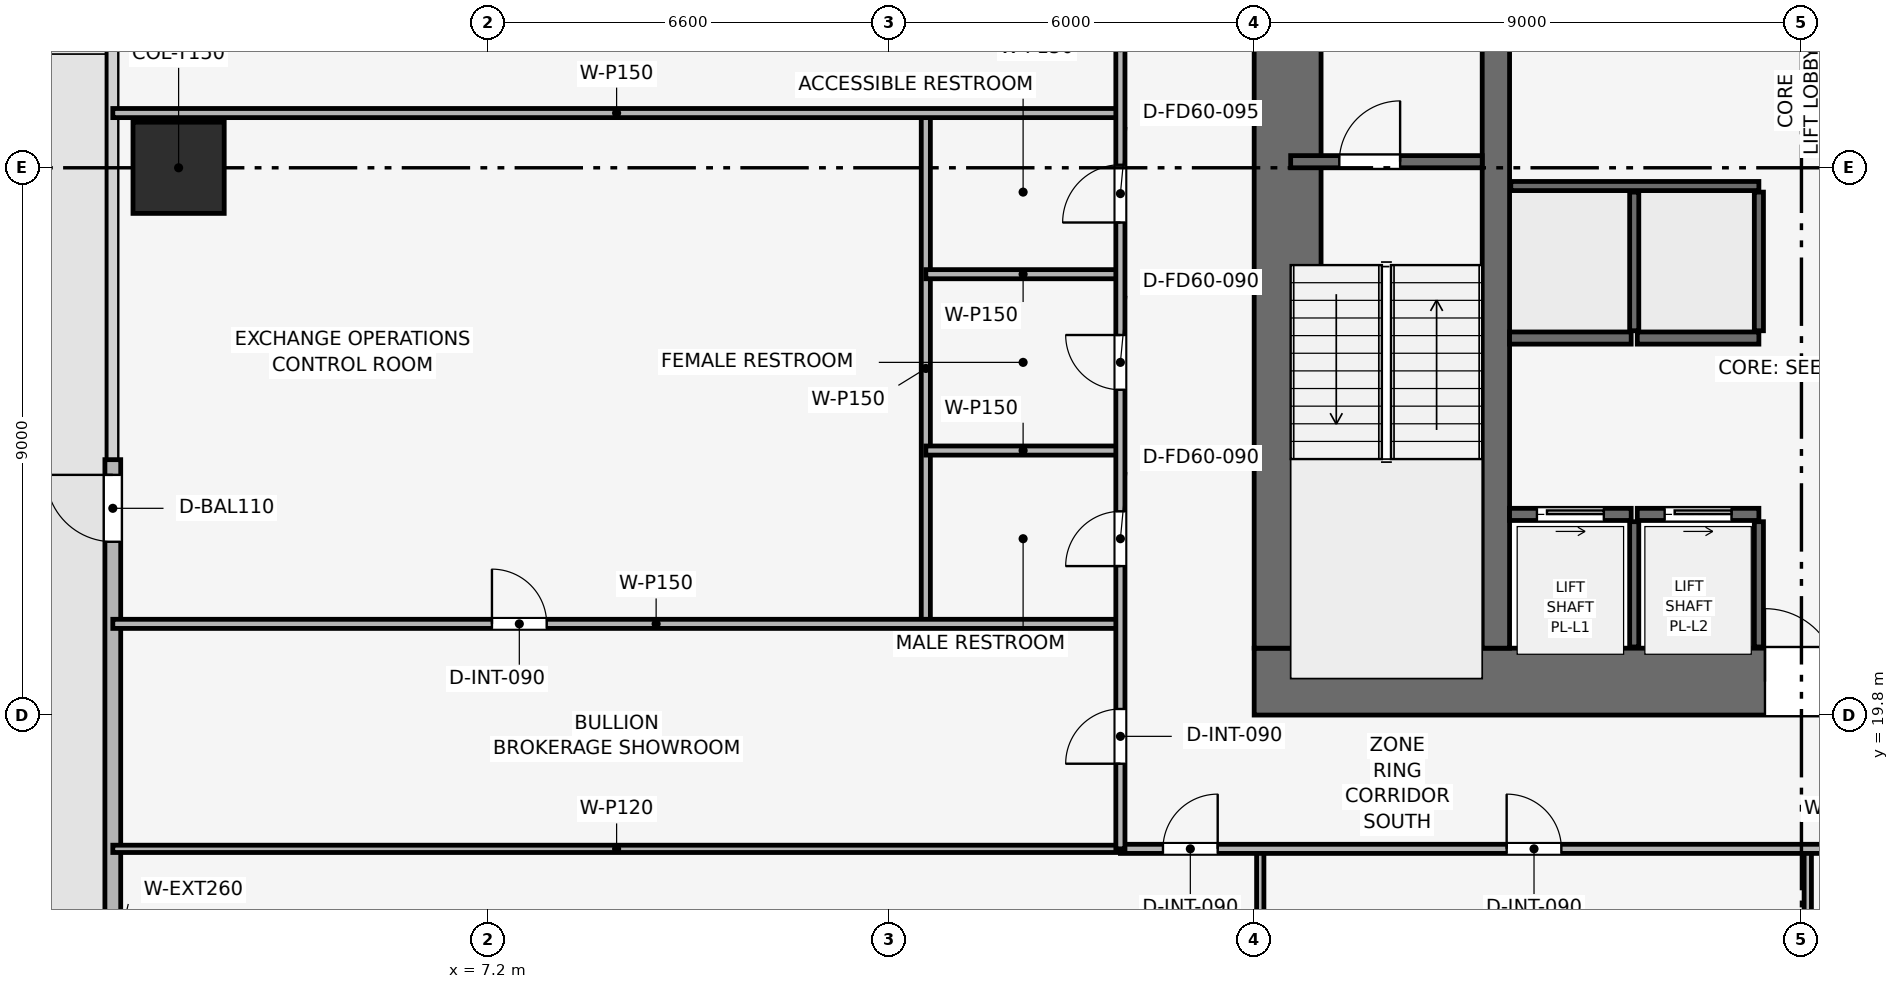
"""IFC4 building model, lengths in metres.
Left out: names, types, materials, properties, quantities, classifications, styles, units other than length and angle.
Written with IfcOpenShell. Run it as: python <this file> out.ifc"""

import sys

from ifc_helpers import new_model, si_unit, direction, frame, frame_2d, origin, origin_2d, place, context, subcontext, project, spatial, rectangle, extrude, element, fill, save


model = new_model("IFC4")
c1 = context("Model", 3, precision=1e-05, world=origin(), true_north=direction((0.0, 1.0)))
c2 = subcontext(c1, "Body", "Model", "MODEL_VIEW")
j1 = project(units=[si_unit("LENGTHUNIT", "METRE"), si_unit("PLANEANGLEUNIT", "RADIAN")], contexts=[c1])
p1 = place(None, origin())
s1 = spatial("IfcSite", under=j1, at=p1, CompositionType="ELEMENT")
p2 = place(p1, origin())
s2 = spatial("IfcBuilding", under=s1, at=p2, CompositionType="ELEMENT")
p3 = place(p2, frame((0.0, 0.0, 104.1)))
s3 = spatial("IfcBuildingStorey", under=s2, at=p3, CompositionType="ELEMENT", Elevation=104.1)
p4 = place(p3, frame((19.8, 20.35, 0.0), z_axis=(0.0, 0.0, 1.0), x_axis=(1.0, 0.0, 0.0)))
e1 = element("IfcWall", 1, at=p4, inside=s3, PredefinedType="SHEAR", context=c2, shape_type="SweptSolid", body=[
    extrude(rectangle(XDim=18.0, YDim=1.1, at=frame_2d((9.0, 0.0))), origin(), (0.0, 0.0, 1.0), 3.9),
])
p5 = place(p4, frame((8.4, 0.0, 0.0)))
e2 = element("IfcOpeningElement", 2, at=p5, cuts=e1, PredefinedType="OPENING", context=c2, shape_type="SweptSolid", body=[
    extrude(rectangle(XDim=1.2, YDim=2.2, at=frame_2d((0.6, 1.1))), frame((0.0, 0.56, 0.0), z_axis=(0.0, -1.0, 0.0), x_axis=(1.0, 0.0, 0.0)), (0.0, 0.0, 1.0), 1.12),
])
p6 = place(p3, frame((20.35, 20.9, 0.0), z_axis=(0.0, 0.0, 1.0), x_axis=(0.0, 1.0, 0.0)))
e3 = element("IfcWall", 3, at=p6, inside=s3, PredefinedType="SHEAR", context=c2, shape_type="SweptSolid", body=[
    extrude(rectangle(XDim=15.8, YDim=1.1, at=frame_2d((7.9, 0.0))), origin(), (0.0, 0.0, 1.0), 3.9),
])
p7 = place(p6, frame((9.9, 0.0, 0.0)))
e4 = element("IfcOpeningElement", 4, at=p7, cuts=e3, PredefinedType="OPENING", context=c2, shape_type="SweptSolid", body=[
    extrude(rectangle(XDim=1.1, YDim=2.15, at=frame_2d((0.55, 1.075))), frame((0.0, 0.56, 0.0), z_axis=(0.0, -1.0, 0.0), x_axis=(1.0, 0.0, 0.0)), (0.0, 0.0, 1.0), 1.12),
])
p8 = place(p3, frame((23.775, 20.9, 0.0), z_axis=(0.0, 0.0, 1.0), x_axis=(0.0, 1.0, 0.0)))
e5 = element("IfcWall", 5, at=p8, inside=s3, PredefinedType="SHEAR", context=c2, shape_type="SweptSolid", body=[
    extrude(rectangle(XDim=15.8, YDim=0.45, at=frame_2d((7.9, 0.0))), origin(), (0.0, 0.0, 1.0), 3.9),
])
p9 = place(p3, frame((2.112, 28.8, 0.053), z_axis=(0.224854519766, 0.0, 0.974392346512), x_axis=(0.0, 1.0, 0.0)))
e6 = element("IfcColumn", 6, at=p9, inside=s3, PredefinedType="COLUMN", context=c2, shape_type="SweptSolid", body=[
    extrude(rectangle(XDim=1.5, YDim=1.5, at=origin_2d()), origin(), (0.0, 0.0, 1.0), 3.575),
])
p10 = place(p3, frame((1.03, 8.7, 0.0), z_axis=(0.0, 0.0, 1.0), x_axis=(0.0, 1.0, 0.0)))
e7 = element("IfcWall", 7, at=p10, inside=s3, PredefinedType="SOLIDWALL", context=c2, shape_type="SweptSolid", body=[
    extrude(rectangle(XDim=15.3, YDim=0.26, at=frame_2d((7.65, 0.0))), origin(), (0.0, 0.0, 1.0), 3.54),
])
p11 = place(p10, frame((13.95, 0.0, 0.0)))
e8 = element("IfcOpeningElement", 8, at=p11, cuts=e7, PredefinedType="OPENING", context=c2, shape_type="SweptSolid", body=[
    extrude(rectangle(XDim=1.1, YDim=2.2, at=frame_2d((0.55, 1.1))), frame((0.0, 0.14, 0.0), z_axis=(0.0, -1.0, 0.0), x_axis=(1.0, 0.0, 0.0)), (0.0, 0.0, 1.0), 0.28),
])
p12 = place(p3, frame((20.4, 28.9, 0.0), z_axis=(0.0, 0.0, 1.0), x_axis=(1.0, 0.0, 0.0)))
e9 = element("IfcWall", 9, at=p12, inside=s3, PredefinedType="SHEAR", context=c2, shape_type="SweptSolid", body=[
    extrude(rectangle(XDim=3.15, YDim=0.2, at=frame_2d((1.575, 0.0))), origin(), (0.0, 0.0, 1.0), 3.54),
])
p13 = place(p12, frame((0.8, 0.0, 0.0)))
e10 = element("IfcOpeningElement", 10, at=p13, cuts=e9, PredefinedType="OPENING", context=c2, shape_type="SweptSolid", body=[
    extrude(rectangle(XDim=1.0, YDim=2.1, at=frame_2d((0.5, 1.05))), frame((0.0, 0.11, 0.0), z_axis=(0.0, -1.0, 0.0), x_axis=(1.0, 0.0, 0.0)), (0.0, 0.0, 1.0), 0.22),
])
p14 = place(p3, frame((24.0, 23.1, 0.0), z_axis=(0.0, 0.0, 1.0), x_axis=(1.0, 0.0, 0.0)))
e11 = element("IfcWall", 11, at=p14, inside=s3, PredefinedType="SHEAR", context=c2, shape_type="SweptSolid", body=[
    extrude(rectangle(XDim=2.0, YDim=0.2, at=frame_2d((1.0, 0.0))), origin(), (0.0, 0.0, 1.0), 3.54),
])
p15 = place(p14, frame((0.45, 0.0, 0.0)))
e12 = element("IfcOpeningElement", 12, at=p15, cuts=e11, PredefinedType="OPENING", context=c2, shape_type="SweptSolid", body=[
    extrude(rectangle(XDim=1.1, YDim=2.15, at=frame_2d((0.55, 1.075))), frame((0.0, 0.11, 0.0), z_axis=(0.0, -1.0, 0.0), x_axis=(1.0, 0.0, 0.0)), (0.0, 0.0, 1.0), 0.22),
])
p16 = place(p3, frame((26.1, 23.1, 0.0), z_axis=(0.0, 0.0, 1.0), x_axis=(1.0, 0.0, 0.0)))
e13 = element("IfcWall", 13, at=p16, inside=s3, PredefinedType="SHEAR", context=c2, shape_type="SweptSolid", body=[
    extrude(rectangle(XDim=2.0, YDim=0.2, at=frame_2d((1.0, 0.0))), origin(), (0.0, 0.0, 1.0), 3.54),
])
p17 = place(p16, frame((0.45, 0.0, 0.0)))
e14 = element("IfcOpeningElement", 14, at=p17, cuts=e13, PredefinedType="OPENING", context=c2, shape_type="SweptSolid", body=[
    extrude(rectangle(XDim=1.1, YDim=2.15, at=frame_2d((0.55, 1.075))), frame((0.0, 0.11, 0.0), z_axis=(0.0, -1.0, 0.0), x_axis=(1.0, 0.0, 0.0)), (0.0, 0.0, 1.0), 0.22),
])
for number, where, z_axis, x_axis in (
    (15, (24.0, 26.0, 0.0), (0.0, 0.0, 1.0), (1.0, 0.0, 0.0)),
    (16, (26.1, 26.0, 0.0), (0.0, 0.0, 1.0), (1.0, 0.0, 0.0)),
):
    element("IfcWall", number, at=place(p3, frame(where, z_axis=z_axis, x_axis=x_axis)), inside=s3, PredefinedType="SHEAR", context=c2, shape_type="SweptSolid", body=[
        extrude(rectangle(XDim=2.0, YDim=0.2, at=frame_2d((1.0, 0.0))), origin(), (0.0, 0.0, 1.0), 3.54),
    ])
for number, where, z_axis, x_axis in (
    (17, (26.05, 20.92, 0.0), (0.0, 0.0, 1.0), (0.0, 1.0, 0.0)),
    (18, (28.1, 20.92, 0.0), (0.0, 0.0, 1.0), (0.0, 1.0, 0.0)),
):
    element("IfcWall", number, at=place(p3, frame(where, z_axis=z_axis, x_axis=x_axis)), inside=s3, PredefinedType="SHEAR", context=c2, shape_type="SweptSolid", body=[
        extrude(rectangle(XDim=2.06, YDim=0.15, at=frame_2d((1.03, 0.0))), origin(), (0.0, 0.0, 1.0), 3.54),
    ])
p18 = place(p3, frame((24.02, 28.5, 0.0), z_axis=(0.0, 0.0, 1.0), x_axis=(1.0, 0.0, 0.0)))
e19 = element("IfcWall", 19, at=p18, inside=s3, PredefinedType="SHEAR", context=c2, shape_type="SweptSolid", body=[
    extrude(rectangle(XDim=4.08, YDim=0.15, at=frame_2d((2.04, 0.0))), origin(), (0.0, 0.0, 1.0), 3.54),
])
for number, where, z_axis, x_axis in (
    (20, (26.05, 26.12, 0.0), (0.0, 0.0, 1.0), (0.0, 1.0, 0.0)),
    (21, (28.1, 26.12, 0.0), (0.0, 0.0, 1.0), (0.0, 1.0, 0.0)),
):
    element("IfcWall", number, at=place(p3, frame(where, z_axis=z_axis, x_axis=x_axis)), inside=s3, PredefinedType="SHEAR", context=c2, shape_type="SweptSolid", body=[
        extrude(rectangle(XDim=2.28, YDim=0.15, at=frame_2d((1.14, 0.0))), origin(), (0.0, 0.0, 1.0), 3.54),
    ])
p19 = place(p3, frame((19.9, 1.03, 0.0), z_axis=(0.0, 0.0, 1.0), x_axis=(0.0, 1.0, 0.0)))
e22 = element("IfcWall", 22, at=p19, inside=s3, PredefinedType="PARTITIONING", context=c2, shape_type="SweptSolid", body=[
    extrude(rectangle(XDim=16.57, YDim=0.12, at=frame_2d((8.285, 0.0))), origin(), (0.0, 0.0, 1.0), 2.825),
])
p20 = place(p3, frame((28.904, 1.03, 0.0), z_axis=(0.0, 0.0, 1.0), x_axis=(0.0, 1.0, 0.0)))
e23 = element("IfcWall", 23, at=p20, inside=s3, PredefinedType="PARTITIONING", context=c2, shape_type="SweptSolid", body=[
    extrude(rectangle(XDim=16.57, YDim=0.12, at=frame_2d((8.285, 0.0))), origin(), (0.0, 0.0, 1.0), 2.975),
])
p21 = place(p3, frame((1.03, 17.6, 0.0), z_axis=(0.0, 0.0, 1.0), x_axis=(1.0, 0.0, 0.0)))
e24 = element("IfcWall", 24, at=p21, inside=s3, PredefinedType="PARTITIONING", context=c2, shape_type="SweptSolid", body=[
    extrude(rectangle(XDim=16.57, YDim=0.12, at=frame_2d((8.285, 0.0))), origin(), (0.0, 0.0, 1.0), 2.825),
])
p22 = place(p3, frame((14.4, 21.3, 0.0), z_axis=(0.0, 0.0, 1.0), x_axis=(0.0, 1.0, 0.0)))
e25 = element("IfcWall", 25, at=p22, inside=s3, PredefinedType="PARTITIONING", context=c2, shape_type="SweptSolid", body=[
    extrude(rectangle(XDim=8.4, YDim=0.15, at=frame_2d((4.2, 0.0))), origin(), (0.0, 0.0, 1.0), 2.975),
])
p23 = place(p3, frame((1.03, 21.3, 0.0), z_axis=(0.0, 0.0, 1.0), x_axis=(1.0, 0.0, 0.0)))
e26 = element("IfcWall", 26, at=p23, inside=s3, PredefinedType="PARTITIONING", context=c2, shape_type="SweptSolid", body=[
    extrude(rectangle(XDim=16.57, YDim=0.15, at=frame_2d((8.285, 0.0))), origin(), (0.0, 0.0, 1.0), 2.825),
])
p24 = place(p23, frame((6.235, 0.0, 0.0)))
e27 = element("IfcOpeningElement", 27, at=p24, cuts=e26, PredefinedType="OPENING", context=c2, shape_type="SweptSolid", body=[
    extrude(rectangle(XDim=0.9, YDim=2.1, at=frame_2d((0.45, 1.05))), frame((0.0, 0.085, 0.0), z_axis=(0.0, -1.0, 0.0), x_axis=(1.0, 0.0, 0.0)), (0.0, 0.0, 1.0), 0.17),
])
p25 = place(p3, frame((1.03, 29.7, 0.0), z_axis=(0.0, 0.0, 1.0), x_axis=(1.0, 0.0, 0.0)))
e28 = element("IfcWall", 28, at=p25, inside=s3, PredefinedType="PARTITIONING", context=c2, shape_type="SweptSolid", body=[
    extrude(rectangle(XDim=16.57, YDim=0.15, at=frame_2d((8.285, 0.0))), origin(), (0.0, 0.0, 1.0), 2.825),
])
for number, where, z_axis, x_axis in (
    (29, (14.4, 24.15, 0.0), (0.0, 0.0, 1.0), (1.0, 0.0, 0.0)),
    (30, (14.4, 27.05, 0.0), (0.0, 0.0, 1.0), (1.0, 0.0, 0.0)),
):
    element("IfcWall", number, at=place(p3, frame(where, z_axis=z_axis, x_axis=x_axis)), inside=s3, PredefinedType="PARTITIONING", context=c2, shape_type="SweptSolid", body=[
        extrude(rectangle(XDim=3.2, YDim=0.15, at=frame_2d((1.6, 0.0))), origin(), (0.0, 0.0, 1.0), 3.54),
    ])
p26 = place(p3, frame((17.6, 17.6, 0.0), z_axis=(0.0, 0.0, 1.0), x_axis=(1.0, 0.0, 0.0)))
e31 = element("IfcWall", 31, at=p26, inside=s3, PredefinedType="PARTITIONING", context=c2, shape_type="SweptSolid", body=[
    extrude(rectangle(XDim=22.4, YDim=0.15, at=frame_2d((11.2, 0.0))), origin(), (0.0, 0.0, 1.0), 2.975),
])
p27 = place(p26, frame((0.7, 0.0, 0.0)))
e32 = element("IfcOpeningElement", 32, at=p27, cuts=e31, PredefinedType="OPENING", context=c2, shape_type="SweptSolid", body=[
    extrude(rectangle(XDim=0.9, YDim=2.1, at=frame_2d((0.45, 1.05))), frame((0.0, 0.085, 0.0), z_axis=(0.0, -1.0, 0.0), x_axis=(1.0, 0.0, 0.0)), (0.0, 0.0, 1.0), 0.17),
])
p28 = place(p26, frame((6.352, 0.0, 0.0)))
e33 = element("IfcOpeningElement", 33, at=p28, cuts=e31, PredefinedType="OPENING", context=c2, shape_type="SweptSolid", body=[
    extrude(rectangle(XDim=0.9, YDim=2.1, at=frame_2d((0.45, 1.05))), frame((0.0, 0.085, 0.0), z_axis=(0.0, -1.0, 0.0), x_axis=(1.0, 0.0, 0.0)), (0.0, 0.0, 1.0), 0.17),
])
p29 = place(p26, frame((16.402, 0.0, 0.0)))
e34 = element("IfcOpeningElement", 34, at=p29, cuts=e31, PredefinedType="OPENING", context=c2, shape_type="SweptSolid", body=[
    extrude(rectangle(XDim=0.9, YDim=2.1, at=frame_2d((0.45, 1.05))), frame((0.0, 0.085, 0.0), z_axis=(0.0, -1.0, 0.0), x_axis=(1.0, 0.0, 0.0)), (0.0, 0.0, 1.0), 0.17),
])
p30 = place(p3, frame((17.6, 17.6, 0.0), z_axis=(0.0, 0.0, 1.0), x_axis=(0.0, 1.0, 0.0)))
e35 = element("IfcWall", 35, at=p30, inside=s3, PredefinedType="PARTITIONING", context=c2, shape_type="SweptSolid", body=[
    extrude(rectangle(XDim=22.4, YDim=0.15, at=frame_2d((11.2, 0.0))), origin(), (0.0, 0.0, 1.0), 2.975),
])
p31 = place(p30, frame((1.4, 0.0, 0.0)))
e36 = element("IfcOpeningElement", 36, at=p31, cuts=e35, PredefinedType="OPENING", context=c2, shape_type="SweptSolid", body=[
    extrude(rectangle(XDim=0.9, YDim=2.1, at=frame_2d((0.45, 1.05))), frame((0.0, 0.085, 0.0), z_axis=(0.0, -1.0, 0.0), x_axis=(1.0, 0.0, 0.0)), (0.0, 0.0, 1.0), 0.17),
])
p32 = place(p30, frame((4.65, 0.0, 0.0)))
e37 = element("IfcOpeningElement", 37, at=p32, cuts=e35, PredefinedType="OPENING", context=c2, shape_type="SweptSolid", body=[
    extrude(rectangle(XDim=0.9, YDim=2.1, at=frame_2d((0.45, 1.05))), frame((0.0, 0.085, 0.0), z_axis=(0.0, -1.0, 0.0), x_axis=(1.0, 0.0, 0.0)), (0.0, 0.0, 1.0), 0.17),
])
p33 = place(p30, frame((7.55, 0.0, 0.0)))
e38 = element("IfcOpeningElement", 38, at=p33, cuts=e35, PredefinedType="OPENING", context=c2, shape_type="SweptSolid", body=[
    extrude(rectangle(XDim=0.9, YDim=2.1, at=frame_2d((0.45, 1.05))), frame((0.0, 0.085, 0.0), z_axis=(0.0, -1.0, 0.0), x_axis=(1.0, 0.0, 0.0)), (0.0, 0.0, 1.0), 0.17),
])
p34 = place(p30, frame((10.3, 0.0, 0.0)))
e39 = element("IfcOpeningElement", 39, at=p34, cuts=e35, PredefinedType="OPENING", context=c2, shape_type="SweptSolid", body=[
    extrude(rectangle(XDim=0.95, YDim=2.1, at=frame_2d((0.475, 1.05))), frame((0.0, 0.085, 0.0), z_axis=(0.0, -1.0, 0.0), x_axis=(1.0, 0.0, 0.0)), (0.0, 0.0, 1.0), 0.17),
])
p35 = place(p30, frame((16.8, 0.0, 0.0)))
e40 = element("IfcOpeningElement", 40, at=p35, cuts=e35, PredefinedType="OPENING", context=c2, shape_type="SweptSolid", body=[
    extrude(rectangle(XDim=0.9, YDim=2.1, at=frame_2d((0.45, 1.05))), frame((0.0, 0.085, 0.0), z_axis=(0.0, -1.0, 0.0), x_axis=(1.0, 0.0, 0.0)), (0.0, 0.0, 1.0), 0.17),
])
p36 = place(p11, origin())
e41 = element("IfcDoor", 41, at=p36, inside=s3, OperationType="SINGLE_SWING_RIGHT", PredefinedType="DOOR", context=c2, shape_type="SweptSolid", body=[
    extrude(rectangle(XDim=1.1, YDim=2.2, at=frame_2d((0.55, 1.1))), frame((0.0, 0.025, 0.0), z_axis=(0.0, -1.0, 0.0), x_axis=(1.0, 0.0, 0.0)), (0.0, 0.0, 1.0), 0.05),
])
fill(e8, e41)
p37 = place(p13, origin())
e42 = element("IfcDoor", 42, at=p37, inside=s3, OperationType="SINGLE_SWING_RIGHT", PredefinedType="DOOR", context=c2, shape_type="SweptSolid", body=[
    extrude(rectangle(XDim=1.0, YDim=2.1, at=frame_2d((0.5, 1.05))), frame((0.0, 0.025, 0.0), z_axis=(0.0, -1.0, 0.0), x_axis=(1.0, 0.0, 0.0)), (0.0, 0.0, 1.0), 0.05),
])
fill(e10, e42)
p38 = place(p15, origin())
e43 = element("IfcDoor", 43, at=p38, inside=s3, OperationType="SLIDING_TO_RIGHT", PredefinedType="DOOR", context=c2, shape_type="SweptSolid", body=[
    extrude(rectangle(XDim=1.1, YDim=2.15, at=frame_2d((0.55, 1.075))), frame((0.0, 0.025, 0.0), z_axis=(0.0, -1.0, 0.0), x_axis=(1.0, 0.0, 0.0)), (0.0, 0.0, 1.0), 0.05),
])
fill(e12, e43)
p39 = place(p17, origin())
e44 = element("IfcDoor", 44, at=p39, inside=s3, OperationType="SLIDING_TO_RIGHT", PredefinedType="DOOR", context=c2, shape_type="SweptSolid", body=[
    extrude(rectangle(XDim=1.1, YDim=2.15, at=frame_2d((0.55, 1.075))), frame((0.0, 0.025, 0.0), z_axis=(0.0, -1.0, 0.0), x_axis=(1.0, 0.0, 0.0)), (0.0, 0.0, 1.0), 0.05),
])
fill(e14, e44)
p40 = place(p24, origin())
e45 = element("IfcDoor", 45, at=p40, inside=s3, OperationType="SINGLE_SWING_LEFT", PredefinedType="DOOR", context=c2, shape_type="SweptSolid", body=[
    extrude(rectangle(XDim=0.9, YDim=2.1, at=frame_2d((0.45, 1.05))), frame((0.0, 0.025, 0.0), z_axis=(0.0, -1.0, 0.0), x_axis=(1.0, 0.0, 0.0)), (0.0, 0.0, 1.0), 0.05),
])
fill(e27, e45)
p41 = place(p27, origin())
e46 = element("IfcDoor", 46, at=p41, inside=s3, OperationType="SINGLE_SWING_RIGHT", PredefinedType="DOOR", context=c2, shape_type="SweptSolid", body=[
    extrude(rectangle(XDim=0.9, YDim=2.1, at=frame_2d((0.45, 1.05))), frame((0.0, 0.025, 0.0), z_axis=(0.0, -1.0, 0.0), x_axis=(1.0, 0.0, 0.0)), (0.0, 0.0, 1.0), 0.05),
])
fill(e32, e46)
p42 = place(p28, origin())
e47 = element("IfcDoor", 47, at=p42, inside=s3, OperationType="SINGLE_SWING_LEFT", PredefinedType="DOOR", context=c2, shape_type="SweptSolid", body=[
    extrude(rectangle(XDim=0.9, YDim=2.1, at=frame_2d((0.45, 1.05))), frame((0.0, 0.025, 0.0), z_axis=(0.0, -1.0, 0.0), x_axis=(1.0, 0.0, 0.0)), (0.0, 0.0, 1.0), 0.05),
])
fill(e33, e47)
p43 = place(p31, origin())
e48 = element("IfcDoor", 48, at=p43, inside=s3, OperationType="SINGLE_SWING_LEFT", PredefinedType="DOOR", context=c2, shape_type="SweptSolid", body=[
    extrude(rectangle(XDim=0.9, YDim=2.1, at=frame_2d((0.45, 1.05))), frame((0.0, 0.025, 0.0), z_axis=(0.0, -1.0, 0.0), x_axis=(1.0, 0.0, 0.0)), (0.0, 0.0, 1.0), 0.05),
])
fill(e36, e48)
p44 = place(p32, origin())
e49 = element("IfcDoor", 49, at=p44, inside=s3, OperationType="SINGLE_SWING_LEFT", PredefinedType="DOOR", context=c2, shape_type="SweptSolid", body=[
    extrude(rectangle(XDim=0.9, YDim=2.1, at=frame_2d((0.45, 1.05))), frame((0.0, 0.025, 0.0), z_axis=(0.0, -1.0, 0.0), x_axis=(1.0, 0.0, 0.0)), (0.0, 0.0, 1.0), 0.05),
])
fill(e37, e49)
p45 = place(p33, origin())
e50 = element("IfcDoor", 50, at=p45, inside=s3, OperationType="SINGLE_SWING_RIGHT", PredefinedType="DOOR", context=c2, shape_type="SweptSolid", body=[
    extrude(rectangle(XDim=0.9, YDim=2.1, at=frame_2d((0.45, 1.05))), frame((0.0, 0.025, 0.0), z_axis=(0.0, -1.0, 0.0), x_axis=(1.0, 0.0, 0.0)), (0.0, 0.0, 1.0), 0.05),
])
fill(e38, e50)
p46 = place(p34, origin())
e51 = element("IfcDoor", 51, at=p46, inside=s3, OperationType="SINGLE_SWING_LEFT", PredefinedType="DOOR", context=c2, shape_type="SweptSolid", body=[
    extrude(rectangle(XDim=0.95, YDim=2.1, at=frame_2d((0.475, 1.05))), frame((0.0, 0.025, 0.0), z_axis=(0.0, -1.0, 0.0), x_axis=(1.0, 0.0, 0.0)), (0.0, 0.0, 1.0), 0.05),
])
fill(e39, e51)
p47 = place(p5, origin())
e52 = element("IfcDoor", 52, at=p47, inside=s3, OperationType="SINGLE_SWING_LEFT", PredefinedType="DOOR", context=c2, shape_type="SweptSolid", body=[
    extrude(rectangle(XDim=1.2, YDim=2.2, at=frame_2d((0.6, 1.1))), frame((0.0, 0.025, 0.0), z_axis=(0.0, -1.0, 0.0), x_axis=(1.0, 0.0, 0.0)), (0.0, 0.0, 1.0), 0.05),
])
fill(e2, e52)
save(model, sys.argv[1])
